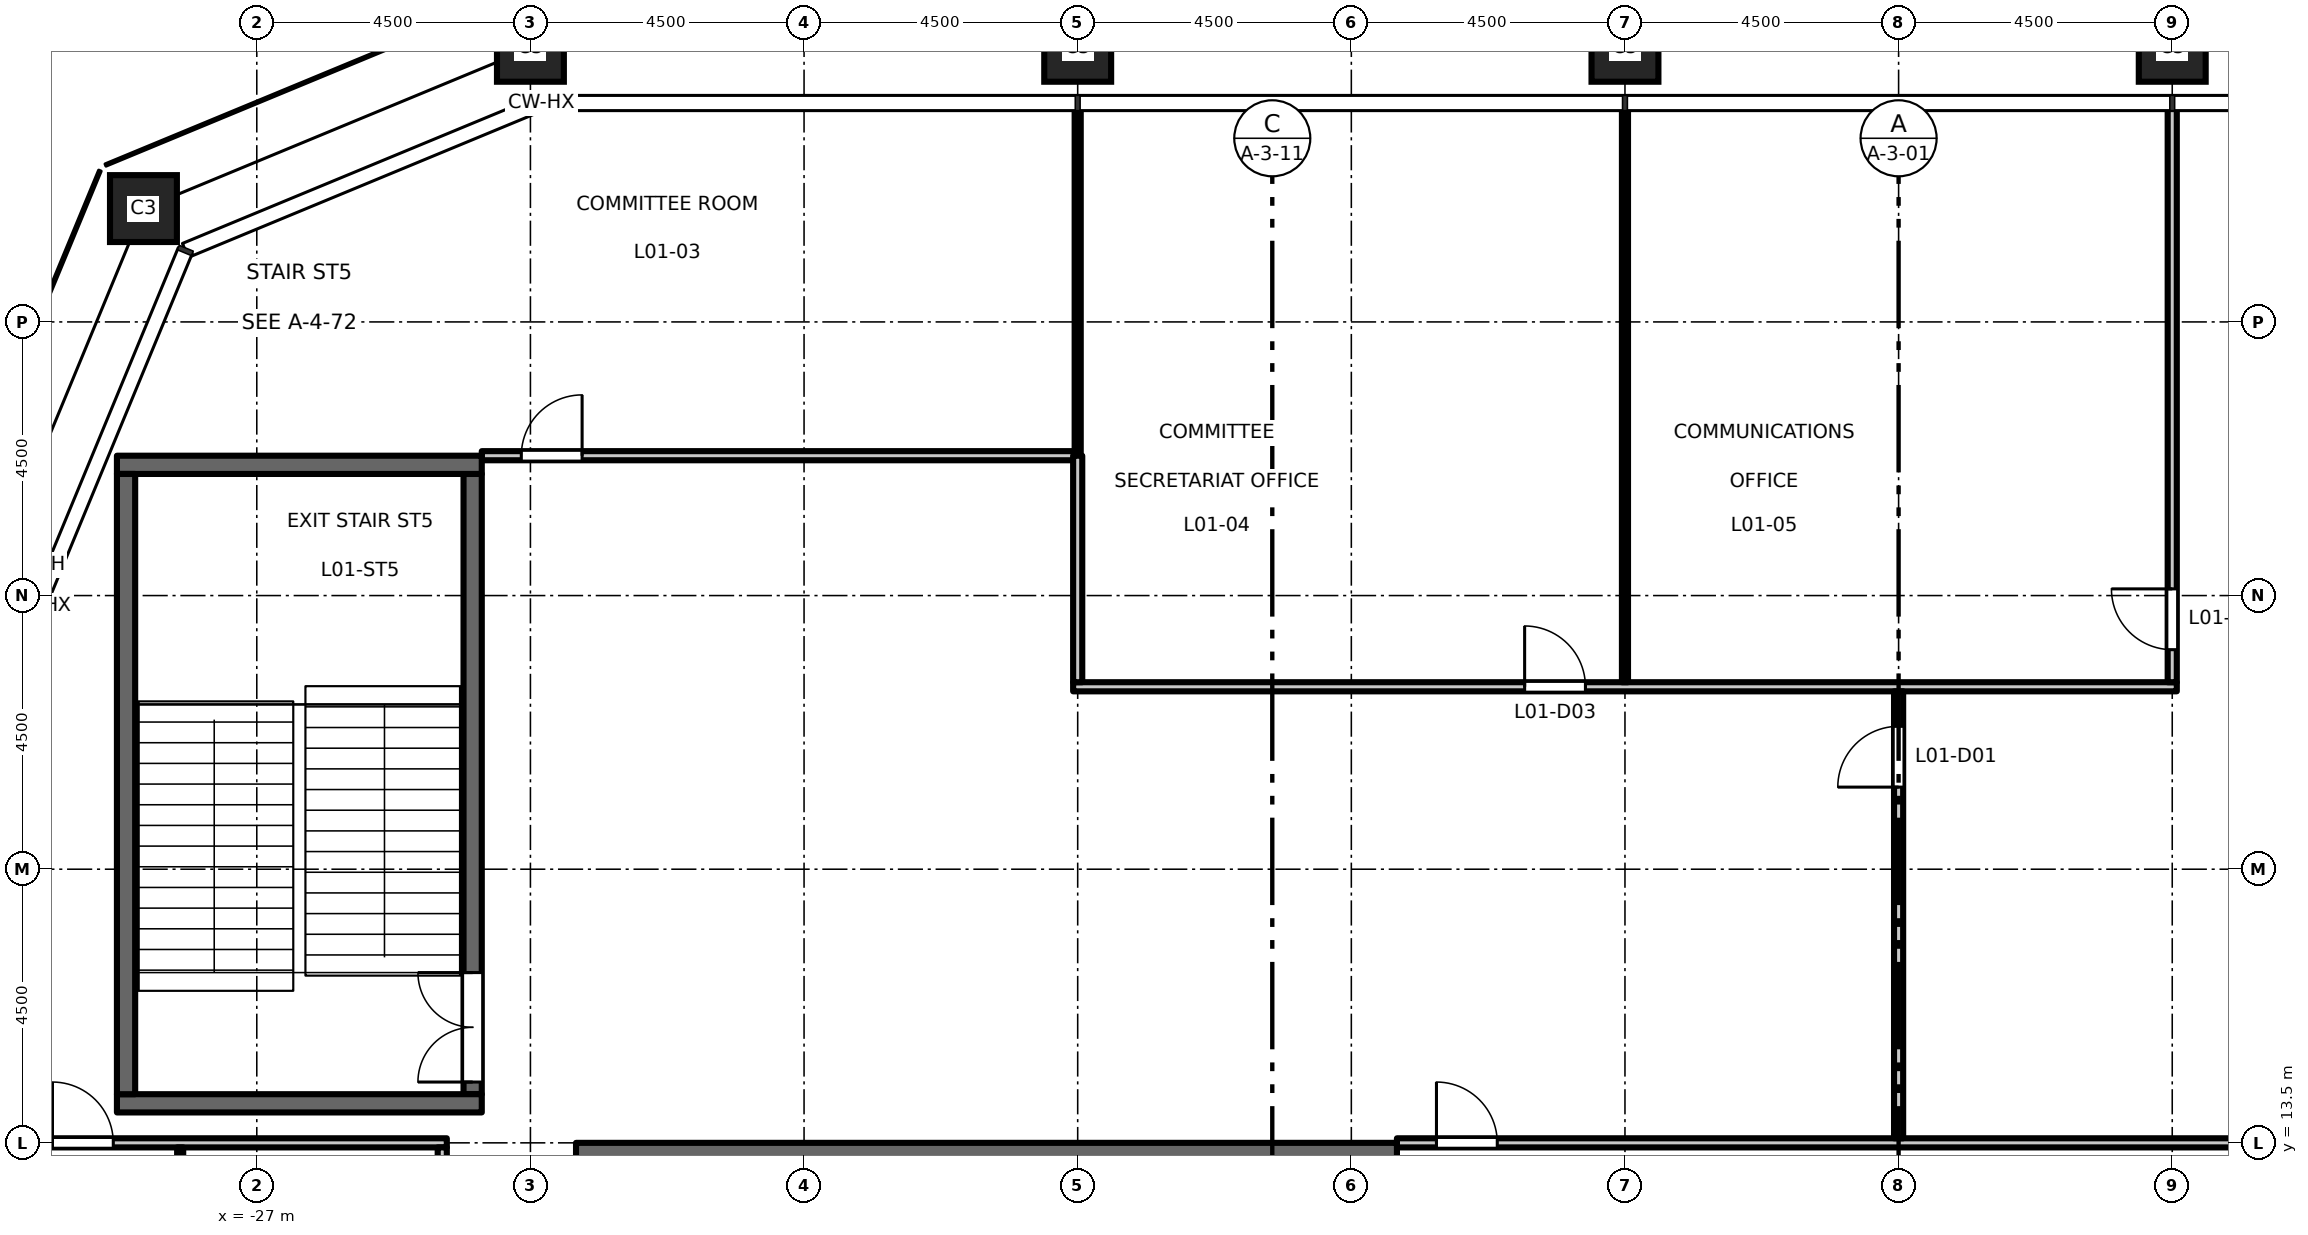
"""IFC4 building model, lengths in metres.
Left out: names, types, materials, properties, quantities, classifications, styles, units other than length and angle.
Written with IfcOpenShell. Run it as: python <this file> out.ifc"""

import sys

from ifc_helpers import new_model, si_unit, direction, frame, frame_2d, origin, origin_2d, place, context, subcontext, project, spatial, rectangle, hollow_rectangle, extrude, element, fill, save


model = new_model("IFC4")
c1 = context("Model", 3, precision=1e-05, world=origin(), true_north=direction((0.0, 1.0)))
c2 = subcontext(c1, "Body", "Model", "MODEL_VIEW")
j1 = project(units=[si_unit("LENGTHUNIT", "METRE"), si_unit("PLANEANGLEUNIT", "RADIAN")], contexts=[c1])
p1 = place(None, origin())
s1 = spatial("IfcSite", under=j1, at=p1, CompositionType="ELEMENT")
p2 = place(p1, origin())
s2 = spatial("IfcBuilding", under=s1, at=p2, CompositionType="ELEMENT")
p3 = place(p2, frame((0.0, 0.0, 7.2)))
s3 = spatial("IfcBuildingStorey", under=s2, at=p3, CompositionType="ELEMENT", Elevation=7.2)
for number, where, z_axis, x_axis in (
    (1, (4.5, 31.5, 0.0), (0.0, 0.0, 1.0), (1.0, 0.0, 0.0)),
    (2, (-4.5, 31.5, 0.0), (0.0, 0.0, 1.0), (1.0, 0.0, 0.0)),
    (3, (-13.5, 31.5, 0.0), (0.0, 0.0, 1.0), (1.0, 0.0, 0.0)),
    (4, (-22.5, 31.5, 0.0), (0.0, 0.0, 1.0), (1.0, 0.0, 0.0)),
    (5, (-28.864, 28.864, 0.0), (0.0, 0.0, 1.0), (1.0, 0.0, 0.0)),
):
    element("IfcColumn", number, at=place(p3, frame(where, z_axis=z_axis, x_axis=x_axis)), inside=s3, PredefinedType="COLUMN", context=c2, shape_type="SweptSolid", body=[
        extrude(hollow_rectangle(XDim=1.1, YDim=1.1, WallThickness=0.07, at=origin_2d()), origin(), (0.0, 0.0, 1.0), 5.0),
    ])
p4 = place(p3, frame((-8.25, 13.25, 0.0), z_axis=(0.0, 0.0, 1.0), x_axis=(-1.0, 0.0, 0.0)))
e6 = element("IfcWall", 6, at=p4, inside=s3, PredefinedType="SHEAR", context=c2, shape_type="SweptSolid", body=[
    extrude(rectangle(XDim=13.5, YDim=0.5, at=frame_2d((6.75, 0.0))), origin(), (0.0, 0.0, 1.0), 4.8),
])
p5 = place(p3, frame((-23.45, 14.3, 0.0), z_axis=(0.0, 0.0, 1.0), x_axis=(0.0, 1.0, 0.0)))
e7 = element("IfcWall", 7, at=p5, inside=s3, PredefinedType="SHEAR", context=c2, shape_type="SweptSolid", body=[
    extrude(rectangle(XDim=10.2, YDim=0.3, at=frame_2d((5.1, 0.0))), origin(), (0.0, 0.0, 1.0), 4.8),
])
p6 = place(p5, frame((0.2, 0.0, 0.0)))
e8 = element("IfcOpeningElement", 8, at=p6, cuts=e7, PredefinedType="OPENING", context=c2, shape_type="SweptSolid", body=[
    extrude(rectangle(XDim=1.8, YDim=2.1, at=frame_2d((0.9, 1.05))), frame((0.0, 0.16, 0.0), z_axis=(0.0, -1.0, 0.0), x_axis=(1.0, 0.0, 0.0)), (0.0, 0.0, 1.0), 0.32),
])
for number, where, z_axis, x_axis in (
    (9, (-29.3, 24.65, 0.0), (0.0, 0.0, 1.0), (1.0, 0.0, 0.0)),
    (10, (-29.3, 14.15, 0.0), (0.0, 0.0, 1.0), (1.0, 0.0, 0.0)),
):
    element("IfcWall", number, at=place(p3, frame(where, z_axis=z_axis, x_axis=x_axis)), inside=s3, PredefinedType="SHEAR", context=c2, shape_type="SweptSolid", body=[
        extrude(rectangle(XDim=6.0, YDim=0.3, at=frame_2d((3.0, 0.0))), origin(), (0.0, 0.0, 1.0), 4.8),
    ])
p7 = place(p3, frame((-29.15, 14.3, 0.0), z_axis=(0.0, 0.0, 1.0), x_axis=(0.0, 1.0, 0.0)))
e11 = element("IfcWall", 11, at=p7, inside=s3, PredefinedType="SHEAR", context=c2, shape_type="SweptSolid", body=[
    extrude(rectangle(XDim=10.2, YDim=0.3, at=frame_2d((5.1, 0.0))), origin(), (0.0, 0.0, 1.0), 4.8),
])
p8 = place(p3, frame((-30.51, 13.5, 0.0), z_axis=(0.0, 0.0, 1.0), x_axis=(1.0, 0.0, 0.0)))
e12 = element("IfcWall", 12, at=p8, inside=s3, PredefinedType="PARTITIONING", context=c2, shape_type="SweptSolid", body=[
    extrude(rectangle(XDim=6.635, YDim=0.15, at=frame_2d((3.317, 0.0))), origin(), (0.0, 0.0, 1.0), 3.8),
])
p9 = place(p8, frame((0.15, 0.0, 0.0)))
e13 = element("IfcOpeningElement", 13, at=p9, cuts=e12, PredefinedType="OPENING", context=c2, shape_type="SweptSolid", body=[
    extrude(rectangle(XDim=1.0, YDim=2.1, at=frame_2d((0.5, 1.05))), frame((0.0, 0.085, 0.0), z_axis=(0.0, -1.0, 0.0), x_axis=(1.0, 0.0, 0.0)), (0.0, 0.0, 1.0), 0.17),
])
p10 = place(p3, frame((-8.25, 13.5, 0.0), z_axis=(0.0, 0.0, 1.0), x_axis=(1.0, 0.0, 0.0)))
e14 = element("IfcWall", 14, at=p10, inside=s3, PredefinedType="PARTITIONING", context=c2, shape_type="SweptSolid", body=[
    extrude(rectangle(XDim=16.5, YDim=0.15, at=frame_2d((8.25, 0.0))), origin(), (0.0, 0.0, 1.0), 4.3),
])
p11 = place(p10, frame((0.65, 0.0, 0.0)))
e15 = element("IfcOpeningElement", 15, at=p11, cuts=e14, PredefinedType="OPENING", context=c2, shape_type="SweptSolid", body=[
    extrude(rectangle(XDim=1.0, YDim=2.1, at=frame_2d((0.5, 1.05))), frame((0.0, 0.085, 0.0), z_axis=(0.0, -1.0, 0.0), x_axis=(1.0, 0.0, 0.0)), (0.0, 0.0, 1.0), 0.17),
])
p12 = place(p3, frame((-13.575, 21.0, 0.0), z_axis=(0.0, 0.0, 1.0), x_axis=(1.0, 0.0, 0.0)))
e16 = element("IfcWall", 16, at=p12, inside=s3, PredefinedType="PARTITIONING", context=c2, shape_type="SweptSolid", body=[
    extrude(rectangle(XDim=18.15, YDim=0.15, at=frame_2d((9.075, 0.0))), origin(), (0.0, 0.0, 1.0), 4.8),
])
p13 = place(p12, frame((7.425, 0.0, 0.0)))
e17 = element("IfcOpeningElement", 17, at=p13, cuts=e16, PredefinedType="OPENING", context=c2, shape_type="SweptSolid", body=[
    extrude(rectangle(XDim=1.0, YDim=2.1, at=frame_2d((0.5, 1.05))), frame((0.0, 0.085, 0.0), z_axis=(0.0, -1.0, 0.0), x_axis=(1.0, 0.0, 0.0)), (0.0, 0.0, 1.0), 0.17),
])
p14 = place(p3, frame((-23.3, 24.8, 0.0), z_axis=(0.0, 0.0, 1.0), x_axis=(1.0, 0.0, 0.0)))
e18 = element("IfcWall", 18, at=p14, inside=s3, PredefinedType="PARTITIONING", context=c2, shape_type="SweptSolid", body=[
    extrude(rectangle(XDim=9.75, YDim=0.15, at=frame_2d((4.875, 0.0))), origin(), (0.0, 0.0, 1.0), 4.8),
])
p15 = place(p14, frame((0.65, 0.0, 0.0)))
e19 = element("IfcOpeningElement", 19, at=p15, cuts=e18, PredefinedType="OPENING", context=c2, shape_type="SweptSolid", body=[
    extrude(rectangle(XDim=1.0, YDim=2.1, at=frame_2d((0.5, 1.05))), frame((0.0, 0.085, 0.0), z_axis=(0.0, -1.0, 0.0), x_axis=(1.0, 0.0, 0.0)), (0.0, 0.0, 1.0), 0.17),
])
p16 = place(p3, frame((-28.26, 3.075, 0.0), z_axis=(0.0, 0.0, 1.0), x_axis=(0.0, 1.0, 0.0)))
e20 = element("IfcWall", 20, at=p16, inside=s3, PredefinedType="PARTITIONING", context=c2, shape_type="SweptSolid", body=[
    extrude(rectangle(XDim=10.35, YDim=0.1, at=frame_2d((5.175, 0.0))), origin(), (0.0, 0.0, 1.0), 4.8),
])
p17 = place(p3, frame((-23.95, 3.075, 0.0), z_axis=(0.0, 0.0, 1.0), x_axis=(0.0, 1.0, 0.0)))
e21 = element("IfcWall", 21, at=p17, inside=s3, PredefinedType="PARTITIONING", context=c2, shape_type="SweptSolid", body=[
    extrude(rectangle(XDim=10.35, YDim=0.15, at=frame_2d((5.175, 0.0))), origin(), (0.0, 0.0, 1.0), 4.8),
])
p18 = place(p17, frame((8.775, 0.0, 0.0)))
e22 = element("IfcOpeningElement", 22, at=p18, cuts=e21, PredefinedType="OPENING", context=c2, shape_type="SweptSolid", body=[
    extrude(rectangle(XDim=1.0, YDim=2.1, at=frame_2d((0.5, 1.05))), frame((0.0, 0.085, 0.0), z_axis=(0.0, -1.0, 0.0), x_axis=(1.0, 0.0, 0.0)), (0.0, 0.0, 1.0), 0.17),
])
p19 = place(p3, frame((-13.5, 24.8, 0.0), z_axis=(0.0, 0.0, 1.0), x_axis=(0.0, 1.0, 0.0)))
e23 = element("IfcWall", 23, at=p19, inside=s3, PredefinedType="PARTITIONING", context=c2, shape_type="SweptSolid", body=[
    extrude(rectangle(XDim=5.71, YDim=0.1, at=frame_2d((2.855, 0.0))), origin(), (0.0, 0.0, 1.0), 3.8),
])
p20 = place(p3, frame((-13.5, 21.075, 0.0), z_axis=(0.0, 0.0, 1.0), x_axis=(0.0, 1.0, 0.0)))
e24 = element("IfcWall", 24, at=p20, inside=s3, PredefinedType="PARTITIONING", context=c2, shape_type="SweptSolid", body=[
    extrude(rectangle(XDim=3.725, YDim=0.15, at=frame_2d((1.863, 0.0))), origin(), (0.0, 0.0, 1.0), 3.8),
])
p21 = place(p3, frame((-4.5, 21.075, 0.0), z_axis=(0.0, 0.0, 1.0), x_axis=(0.0, 1.0, 0.0)))
e25 = element("IfcWall", 25, at=p21, inside=s3, PredefinedType="PARTITIONING", context=c2, shape_type="SweptSolid", body=[
    extrude(rectangle(XDim=9.435, YDim=0.1, at=frame_2d((4.718, 0.0))), origin(), (0.0, 0.0, 1.0), 3.8),
])
p22 = place(p3, frame((0.0, 13.575, 0.0), z_axis=(0.0, 0.0, 1.0), x_axis=(0.0, 1.0, 0.0)))
e26 = element("IfcWall", 26, at=p22, inside=s3, PredefinedType="PARTITIONING", context=c2, shape_type="SweptSolid", body=[
    extrude(rectangle(XDim=7.35, YDim=0.15, at=frame_2d((3.675, 0.0))), origin(), (0.0, 0.0, 1.0), 4.8),
])
p23 = place(p22, frame((5.775, 0.0, 0.0)))
e27 = element("IfcOpeningElement", 27, at=p23, cuts=e26, PredefinedType="OPENING", context=c2, shape_type="SweptSolid", body=[
    extrude(rectangle(XDim=1.0, YDim=2.1, at=frame_2d((0.5, 1.05))), frame((0.0, 0.085, 0.0), z_axis=(0.0, -1.0, 0.0), x_axis=(1.0, 0.0, 0.0)), (0.0, 0.0, 1.0), 0.17),
])
p24 = place(p3, frame((4.5, 21.075, 0.0), z_axis=(0.0, 0.0, 1.0), x_axis=(0.0, 1.0, 0.0)))
e28 = element("IfcWall", 28, at=p24, inside=s3, PredefinedType="PARTITIONING", context=c2, shape_type="SweptSolid", body=[
    extrude(rectangle(XDim=9.435, YDim=0.15, at=frame_2d((4.718, 0.0))), origin(), (0.0, 0.0, 1.0), 3.8),
])
p25 = place(p24, frame((0.535, 0.0, 0.0)))
e29 = element("IfcOpeningElement", 29, at=p25, cuts=e28, PredefinedType="OPENING", context=c2, shape_type="SweptSolid", body=[
    extrude(rectangle(XDim=1.0, YDim=2.1, at=frame_2d((0.5, 1.05))), frame((0.0, 0.085, 0.0), z_axis=(0.0, -1.0, 0.0), x_axis=(1.0, 0.0, 0.0)), (0.0, 0.0, 1.0), 0.17),
])
p26 = place(p6, origin())
e30 = element("IfcDoor", 30, at=p26, inside=s3, OperationType="DOUBLE_DOOR_SINGLE_SWING", PredefinedType="DOOR", context=c2, shape_type="SweptSolid", body=[
    extrude(rectangle(XDim=1.8, YDim=2.1, at=frame_2d((0.9, 1.05))), frame((0.0, 0.025, 0.0), z_axis=(0.0, -1.0, 0.0), x_axis=(1.0, 0.0, 0.0)), (0.0, 0.0, 1.0), 0.05),
])
fill(e8, e30)
p27 = place(p23, origin())
e31 = element("IfcDoor", 31, at=p27, inside=s3, OperationType="SINGLE_SWING_LEFT", PredefinedType="DOOR", context=c2, shape_type="SweptSolid", body=[
    extrude(rectangle(XDim=1.0, YDim=2.1, at=frame_2d((0.5, 1.05))), frame((0.0, 0.025, 0.0), z_axis=(0.0, -1.0, 0.0), x_axis=(1.0, 0.0, 0.0)), (0.0, 0.0, 1.0), 0.05),
])
fill(e27, e31)
p28 = place(p15, origin())
e32 = element("IfcDoor", 32, at=p28, inside=s3, OperationType="SINGLE_SWING_RIGHT", PredefinedType="DOOR", context=c2, shape_type="SweptSolid", body=[
    extrude(rectangle(XDim=1.0, YDim=2.1, at=frame_2d((0.5, 1.05))), frame((0.0, 0.025, 0.0), z_axis=(0.0, -1.0, 0.0), x_axis=(1.0, 0.0, 0.0)), (0.0, 0.0, 1.0), 0.05),
])
fill(e19, e32)
p29 = place(p13, origin())
e33 = element("IfcDoor", 33, at=p29, inside=s3, OperationType="SINGLE_SWING_LEFT", PredefinedType="DOOR", context=c2, shape_type="SweptSolid", body=[
    extrude(rectangle(XDim=1.0, YDim=2.1, at=frame_2d((0.5, 1.05))), frame((0.0, 0.025, 0.0), z_axis=(0.0, -1.0, 0.0), x_axis=(1.0, 0.0, 0.0)), (0.0, 0.0, 1.0), 0.05),
])
fill(e17, e33)
p30 = place(p25, origin())
e34 = element("IfcDoor", 34, at=p30, inside=s3, OperationType="SINGLE_SWING_RIGHT", PredefinedType="DOOR", context=c2, shape_type="SweptSolid", body=[
    extrude(rectangle(XDim=1.0, YDim=2.1, at=frame_2d((0.5, 1.05))), frame((0.0, 0.025, 0.0), z_axis=(0.0, -1.0, 0.0), x_axis=(1.0, 0.0, 0.0)), (0.0, 0.0, 1.0), 0.05),
])
fill(e29, e34)
p31 = place(p11, origin())
e35 = element("IfcDoor", 35, at=p31, inside=s3, OperationType="SINGLE_SWING_LEFT", PredefinedType="DOOR", context=c2, shape_type="SweptSolid", body=[
    extrude(rectangle(XDim=1.0, YDim=2.1, at=frame_2d((0.5, 1.05))), frame((0.0, 0.025, 0.0), z_axis=(0.0, -1.0, 0.0), x_axis=(1.0, 0.0, 0.0)), (0.0, 0.0, 1.0), 0.05),
])
fill(e15, e35)
p32 = place(p9, origin())
e36 = element("IfcDoor", 36, at=p32, inside=s3, OperationType="SINGLE_SWING_LEFT", PredefinedType="DOOR", context=c2, shape_type="SweptSolid", body=[
    extrude(rectangle(XDim=1.0, YDim=2.1, at=frame_2d((0.5, 1.05))), frame((0.0, 0.025, 0.0), z_axis=(0.0, -1.0, 0.0), x_axis=(1.0, 0.0, 0.0)), (0.0, 0.0, 1.0), 0.05),
])
fill(e13, e36)
save(model, sys.argv[1])
